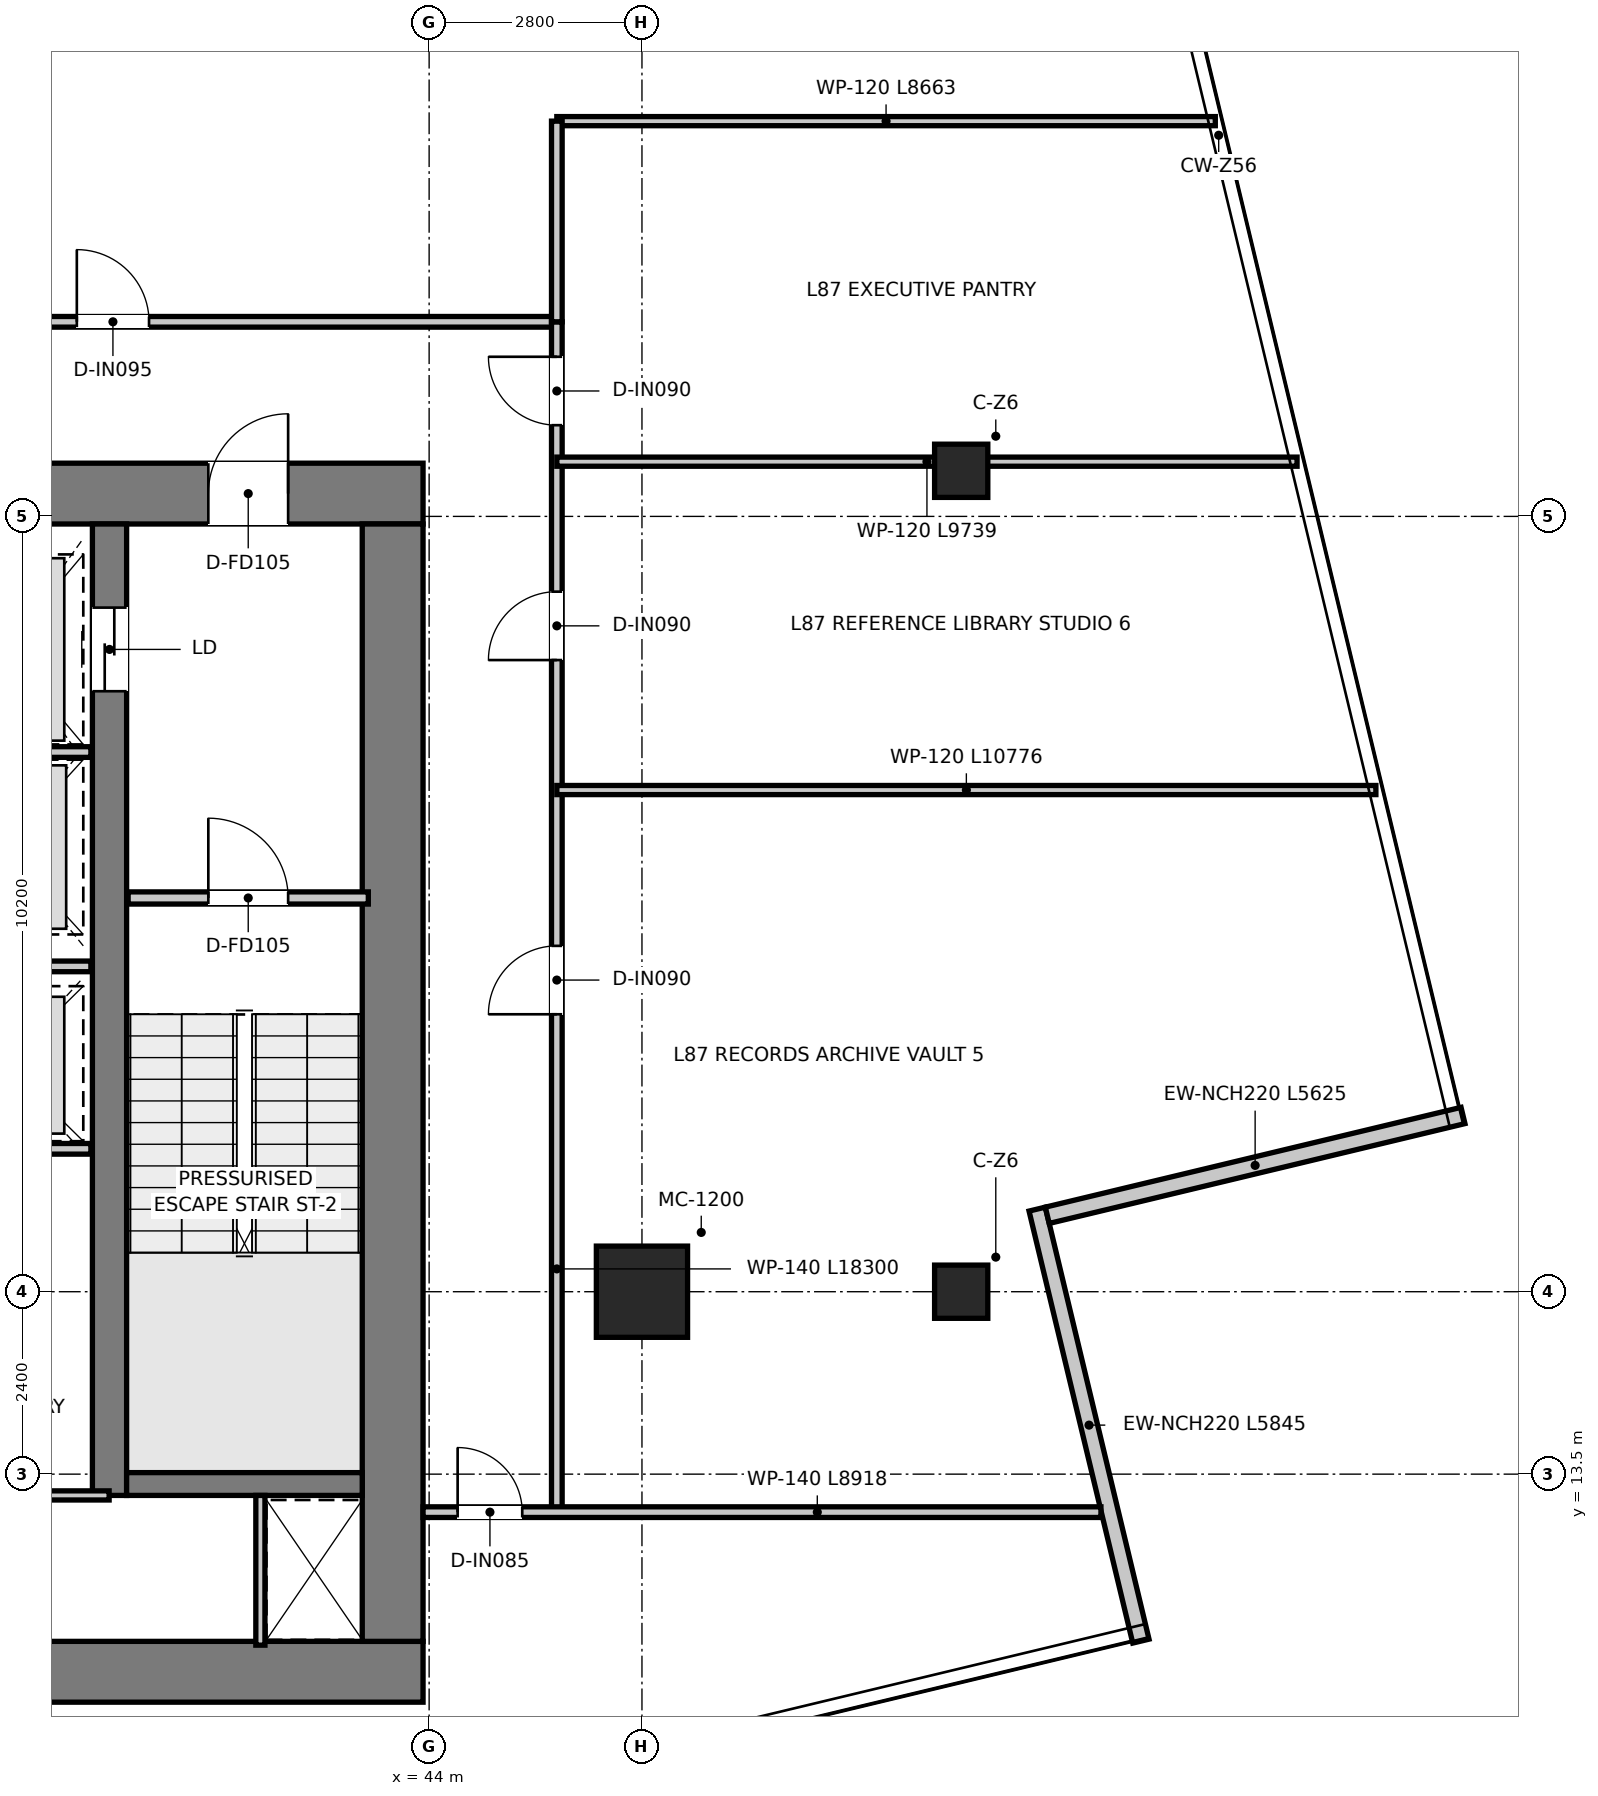
"""IFC4 building model, lengths in metres.
Left out: names, types, materials, properties, quantities, classifications, styles, units other than length and angle.
Written with IfcOpenShell. Run it as: python <this file> out.ifc"""

import sys

from ifc_helpers import new_model, si_unit, direction, frame, frame_2d, origin, origin_2d, place, context, subcontext, project, spatial, rectangle, extrude, source, transform, mapped, element, fill, save


model = new_model("IFC4")
c1 = context("Model", 3, precision=1e-05, world=origin(), true_north=direction((0.0, 1.0)))
c2 = subcontext(c1, "Body", "Model", "MODEL_VIEW")
j1 = project(units=[si_unit("LENGTHUNIT", "METRE"), si_unit("PLANEANGLEUNIT", "RADIAN")], contexts=[c1])
p1 = place(None, origin())
s1 = spatial("IfcSite", under=j1, at=p1, CompositionType="ELEMENT")
p2 = place(p1, origin())
s2 = spatial("IfcBuilding", under=s1, at=p2, CompositionType="ELEMENT")
p3 = place(p2, frame((0.0, 0.0, 355.35)))
s3 = spatial("IfcBuildingStorey", under=s2, at=p3, CompositionType="ELEMENT", Elevation=355.35)
p4 = place(p3, frame((28.08, 10.9, 0.0), z_axis=(0.0, 0.0, 1.0), x_axis=(1.0, 0.0, 0.0)))
e1 = element("IfcWall", 1, at=p4, inside=s3, PredefinedType="SHEAR", context=c2, shape_type="SweptSolid", body=[
    extrude(rectangle(XDim=15.84, YDim=0.8, at=frame_2d((7.92, 0.0))), origin(), (0.0, 0.0, 1.0), 3.95),
])
p5 = place(p3, frame((28.08, 26.4, 0.0), z_axis=(0.0, 0.0, 1.0), x_axis=(1.0, 0.0, 0.0)))
e2 = element("IfcWall", 2, at=p5, inside=s3, PredefinedType="SHEAR", context=c2, shape_type="SweptSolid", body=[
    extrude(rectangle(XDim=15.84, YDim=0.8, at=frame_2d((7.92, 0.0))), origin(), (0.0, 0.0, 1.0), 3.95),
])
p6 = place(p5, frame((7.22, 0.0, 0.0)))
e3 = element("IfcOpeningElement", 3, at=p6, cuts=e2, PredefinedType="OPENING", context=c2, shape_type="SweptSolid", body=[
    extrude(rectangle(XDim=1.4, YDim=2.2, at=frame_2d((0.7, 1.1))), frame((0.0, 0.41, 0.0), z_axis=(0.0, -1.0, 0.0), x_axis=(1.0, 0.0, 0.0)), (0.0, 0.0, 1.0), 0.82),
])
p7 = place(p5, frame((1.775, 0.0, 0.0)))
e4 = element("IfcOpeningElement", 4, at=p7, cuts=e2, PredefinedType="OPENING", context=c2, shape_type="SweptSolid", body=[
    extrude(rectangle(XDim=1.05, YDim=2.1, at=frame_2d((0.525, 1.05))), frame((0.0, 0.41, 0.0), z_axis=(0.0, -1.0, 0.0), x_axis=(1.0, 0.0, 0.0)), (0.0, 0.0, 1.0), 0.82),
])
p8 = place(p5, frame((13.015, 0.0, 0.0)))
e5 = element("IfcOpeningElement", 5, at=p8, cuts=e2, PredefinedType="OPENING", context=c2, shape_type="SweptSolid", body=[
    extrude(rectangle(XDim=1.05, YDim=2.1, at=frame_2d((0.525, 1.05))), frame((0.0, 0.41, 0.0), z_axis=(0.0, -1.0, 0.0), x_axis=(1.0, 0.0, 0.0)), (0.0, 0.0, 1.0), 0.82),
])
p9 = place(p3, frame((43.52, 11.3, 0.0), z_axis=(0.0, 0.0, 1.0), x_axis=(0.0, 1.0, 0.0)))
e6 = element("IfcWall", 6, at=p9, inside=s3, PredefinedType="SHEAR", context=c2, shape_type="SweptSolid", body=[
    extrude(rectangle(XDim=14.7, YDim=0.8, at=frame_2d((7.35, 0.0))), origin(), (0.0, 0.0, 1.0), 3.95),
])
p10 = place(p3, frame((39.795, 13.22, 0.0), z_axis=(0.0, 0.0, 1.0), x_axis=(0.0, 1.0, 0.0)))
e7 = element("IfcWall", 7, at=p10, inside=s3, PredefinedType="SHEAR", context=c2, shape_type="SweptSolid", body=[
    extrude(rectangle(XDim=12.78, YDim=0.45, at=frame_2d((6.39, 0.0))), origin(), (0.0, 0.0, 1.0), 3.95),
])
p11 = place(p10, frame((10.58, 0.0, 0.0)))
e8 = element("IfcOpeningElement", 8, at=p11, cuts=e7, PredefinedType="OPENING", context=c2, shape_type="SweptSolid", body=[
    extrude(rectangle(XDim=1.1, YDim=2.15, at=frame_2d((0.55, 1.075))), frame((0.0, 0.235, 0.0), z_axis=(0.0, -1.0, 0.0), x_axis=(1.0, 0.0, 0.0)), (0.0, 0.0, 1.0), 0.47),
])
p12 = place(p3, frame((40.02, 13.37, 0.0), z_axis=(0.0, 0.0, 1.0), x_axis=(1.0, 0.0, 0.0)))
e9 = element("IfcWall", 9, at=p12, inside=s3, PredefinedType="SHEAR", context=c2, shape_type="SweptSolid", body=[
    extrude(rectangle(XDim=3.1, YDim=0.3, at=frame_2d((1.55, 0.0))), origin(), (0.0, 0.0, 1.0), 3.95),
])
m1 = source(origin(), c2, "Body", "SweptSolid", [
    extrude(rectangle(XDim=1.2, YDim=1.2, at=origin_2d()), origin(), (0.0, 0.0, 1.0), 3.95),
])
p13 = place(p3, frame((46.8, 15.9, 0.0), z_axis=(0.0, 0.0, 1.0), x_axis=(1.0, 0.0, 0.0)))
e10 = element("IfcColumn", 10, at=p13, inside=s3, PredefinedType="USERDEFINED", context=c2, shape_type="MappedRepresentation", body=[
    mapped(m1, transform((0.0, 0.0, 0.0), x_axis=(1.0, 0.0, 0.0), y_axis=(0.0, 1.0, 0.0), z_axis=(0.0, 0.0, 1.0), scale=1.0)),
])
m2 = source(origin(), c2, "Body", "SweptSolid", [
    extrude(rectangle(XDim=0.7, YDim=0.7, at=origin_2d()), origin(), (0.0, 0.0, 1.0), 3.95),
])
for number, where, z_axis, x_axis in (
    (11, (51.0, 26.7, 0.0), (0.0, 0.0, 1.0), (1.0, 0.0, 0.0)),
    (12, (51.0, 15.9, 0.0), (0.0, 0.0, 1.0), (1.0, 0.0, 0.0)),
):
    element("IfcColumn", number, at=place(p3, frame(where, z_axis=z_axis, x_axis=x_axis)), inside=s3, PredefinedType="COLUMN", context=c2, shape_type="MappedRepresentation", body=[
        mapped(m2, transform((0.0, 0.0, 0.0), x_axis=(1.0, 0.0, 0.0), y_axis=(0.0, 1.0, 0.0), z_axis=(0.0, 0.0, 1.0), scale=1.0)),
    ])
p14 = place(p3, frame((53.364, 11.303, 0.0), z_axis=(0.0, 0.0, 1.0), x_axis=(-0.233453521986, 0.972367961768, 0.0)))
e13 = element("IfcWall", 13, at=p14, inside=s3, PredefinedType="ELEMENTEDWALL", context=c2, shape_type="SweptSolid", body=[
    extrude(rectangle(XDim=5.845, YDim=0.22, at=frame_2d((2.922, 0.0))), origin(), (0.0, 0.0, 1.0), 3.67),
])
p15 = place(p3, frame((52.132, 16.905, 0.0), z_axis=(0.0, 0.0, 1.0), x_axis=(0.972364840687, 0.233466521361, 0.0)))
e14 = element("IfcWall", 14, at=p15, inside=s3, PredefinedType="ELEMENTEDWALL", context=c2, shape_type="SweptSolid", body=[
    extrude(rectangle(XDim=5.625, YDim=0.22, at=frame_2d((2.812, 0.0))), origin(), (0.0, 0.0, 1.0), 3.67),
])
p16 = place(p3, frame((40.04, 21.08, 0.0), z_axis=(0.0, 0.0, 1.0), x_axis=(1.0, 0.0, 0.0)))
e15 = element("IfcWall", 15, at=p16, inside=s3, PredefinedType="PARTITIONING", context=c2, shape_type="SweptSolid", body=[
    extrude(rectangle(XDim=3.16, YDim=0.16, at=frame_2d((1.58, 0.0))), origin(), (0.0, 0.0, 1.0), 3.67),
])
p17 = place(p16, frame((1.055, 0.0, 0.0)))
e16 = element("IfcOpeningElement", 16, at=p17, cuts=e15, PredefinedType="OPENING", context=c2, shape_type="SweptSolid", body=[
    extrude(rectangle(XDim=1.05, YDim=2.1, at=frame_2d((0.525, 1.05))), frame((0.0, 0.09, 0.0), z_axis=(0.0, -1.0, 0.0), x_axis=(1.0, 0.0, 0.0)), (0.0, 0.0, 1.0), 0.18),
])
p18 = place(p3, frame((37.28, 23.0, 0.0), z_axis=(0.0, 0.0, 1.0), x_axis=(1.0, 0.0, 0.0)))
e17 = element("IfcWall", 17, at=p18, inside=s3, PredefinedType="PARTITIONING", context=c2, shape_type="SweptSolid", body=[
    extrude(rectangle(XDim=2.27, YDim=0.14, at=frame_2d((1.135, 0.0))), origin(), (0.0, 0.0, 1.0), 2.82),
])
for number, where, z_axis, x_axis in (
    (18, (37.28, 17.78, 0.0), (0.0, 0.0, 1.0), (1.0, 0.0, 0.0)),
    (19, (37.28, 20.18, 0.0), (0.0, 0.0, 1.0), (1.0, 0.0, 0.0)),
):
    element("IfcWall", number, at=place(p3, frame(where, z_axis=z_axis, x_axis=x_axis)), inside=s3, PredefinedType="PARTITIONING", context=c2, shape_type="SweptSolid", body=[
        extrude(rectangle(XDim=2.27, YDim=0.14, at=frame_2d((1.135, 0.0))), origin(), (0.0, 0.0, 1.0), 3.67),
    ])
p19 = place(p3, frame((41.78, 11.25, 0.0), z_axis=(0.0, 0.0, 1.0), x_axis=(0.0, 1.0, 0.0)))
e20 = element("IfcWall", 20, at=p19, inside=s3, PredefinedType="PARTITIONING", context=c2, shape_type="SweptSolid", body=[
    extrude(rectangle(XDim=1.97, YDim=0.12, at=frame_2d((0.985, 0.0))), origin(), (0.0, 0.0, 1.0), 3.67),
])
p20 = place(p3, frame((32.21, 13.22, 0.0), z_axis=(0.0, 0.0, 1.0), x_axis=(1.0, 0.0, 0.0)))
e21 = element("IfcWall", 21, at=p20, inside=s3, PredefinedType="PARTITIONING", context=c2, shape_type="SweptSolid", body=[
    extrude(rectangle(XDim=7.58, YDim=0.12, at=frame_2d((3.79, 0.0))), origin(), (0.0, 0.0, 1.0), 3.67),
])
p21 = place(p20, frame((3.365, 0.0, 0.0)))
e22 = element("IfcOpeningElement", 22, at=p21, cuts=e21, PredefinedType="OPENING", context=c2, shape_type="SweptSolid", body=[
    extrude(rectangle(XDim=0.85, YDim=2.1, at=frame_2d((0.425, 1.05))), frame((0.0, 0.07, 0.0), z_axis=(0.0, -1.0, 0.0), x_axis=(1.0, 0.0, 0.0)), (0.0, 0.0, 1.0), 0.14),
])
p22 = place(p3, frame((26.32, 28.66, 0.0), z_axis=(0.0, 0.0, 1.0), x_axis=(1.0, 0.0, 0.0)))
e23 = element("IfcWall", 23, at=p22, inside=s3, PredefinedType="PARTITIONING", context=c2, shape_type="SweptSolid", body=[
    extrude(rectangle(XDim=19.36, YDim=0.14, at=frame_2d((9.68, 0.0))), origin(), (0.0, 0.0, 1.0), 3.18),
])
p23 = place(p22, frame((3.365, 0.0, 0.0)))
e24 = element("IfcOpeningElement", 24, at=p23, cuts=e23, PredefinedType="OPENING", context=c2, shape_type="SweptSolid", body=[
    extrude(rectangle(XDim=0.95, YDim=2.1, at=frame_2d((0.475, 1.05))), frame((0.0, 0.08, 0.0), z_axis=(0.0, -1.0, 0.0), x_axis=(1.0, 0.0, 0.0)), (0.0, 0.0, 1.0), 0.16),
])
p24 = place(p22, frame((13.045, 0.0, 0.0)))
e25 = element("IfcOpeningElement", 25, at=p24, cuts=e23, PredefinedType="OPENING", context=c2, shape_type="SweptSolid", body=[
    extrude(rectangle(XDim=0.95, YDim=2.1, at=frame_2d((0.475, 1.05))), frame((0.0, 0.08, 0.0), z_axis=(0.0, -1.0, 0.0), x_axis=(1.0, 0.0, 0.0)), (0.0, 0.0, 1.0), 0.16),
])
p25 = place(p3, frame((45.68, 13.0, 0.0), z_axis=(0.0, 0.0, 1.0), x_axis=(0.0, 1.0, 0.0)))
e26 = element("IfcWall", 26, at=p25, inside=s3, PredefinedType="PARTITIONING", context=c2, shape_type="SweptSolid", body=[
    extrude(rectangle(XDim=15.66, YDim=0.14, at=frame_2d((7.83, 0.0))), origin(), (0.0, 0.0, 1.0), 3.13),
])
p26 = place(p25, frame((14.3, 0.0, 0.0)))
e27 = element("IfcOpeningElement", 27, at=p26, cuts=e26, PredefinedType="OPENING", context=c2, shape_type="SweptSolid", body=[
    extrude(rectangle(XDim=0.9, YDim=2.1, at=frame_2d((0.45, 1.05))), frame((0.0, 0.08, 0.0), z_axis=(0.0, -1.0, 0.0), x_axis=(1.0, 0.0, 0.0)), (0.0, 0.0, 1.0), 0.16),
])
p27 = place(p25, frame((6.55, 0.0, 0.0)))
e28 = element("IfcOpeningElement", 28, at=p27, cuts=e26, PredefinedType="OPENING", context=c2, shape_type="SweptSolid", body=[
    extrude(rectangle(XDim=0.9, YDim=2.1, at=frame_2d((0.45, 1.05))), frame((0.0, 0.08, 0.0), z_axis=(0.0, -1.0, 0.0), x_axis=(1.0, 0.0, 0.0)), (0.0, 0.0, 1.0), 0.16),
])
p28 = place(p25, frame((11.21, 0.0, 0.0)))
e29 = element("IfcOpeningElement", 29, at=p28, cuts=e26, PredefinedType="OPENING", context=c2, shape_type="SweptSolid", body=[
    extrude(rectangle(XDim=0.9, YDim=2.1, at=frame_2d((0.45, 1.05))), frame((0.0, 0.08, 0.0), z_axis=(0.0, -1.0, 0.0), x_axis=(1.0, 0.0, 0.0)), (0.0, 0.0, 1.0), 0.16),
])
p29 = place(p3, frame((43.92, 13.0, 0.0), z_axis=(0.0, 0.0, 1.0), x_axis=(1.0, 0.0, 0.0)))
e30 = element("IfcWall", 30, at=p29, inside=s3, PredefinedType="PARTITIONING", context=c2, shape_type="SweptSolid", body=[
    extrude(rectangle(XDim=8.918, YDim=0.14, at=frame_2d((4.459, 0.0))), origin(), (0.0, 0.0, 1.0), 3.18),
])
p30 = place(p29, frame((0.455, 0.0, 0.0)))
e31 = element("IfcOpeningElement", 31, at=p30, cuts=e30, PredefinedType="OPENING", context=c2, shape_type="SweptSolid", body=[
    extrude(rectangle(XDim=0.85, YDim=2.1, at=frame_2d((0.425, 1.05))), frame((0.0, 0.08, 0.0), z_axis=(0.0, -1.0, 0.0), x_axis=(1.0, 0.0, 0.0)), (0.0, 0.0, 1.0), 0.16),
])
p31 = place(p3, frame((45.68, 26.82, 0.0), z_axis=(0.0, 0.0, 1.0), x_axis=(1.0, 0.0, 0.0)))
e32 = element("IfcWall", 32, at=p31, inside=s3, PredefinedType="PARTITIONING", context=c2, shape_type="SweptSolid", body=[
    extrude(rectangle(XDim=9.739, YDim=0.12, at=frame_2d((4.869, 0.0))), origin(), (0.0, 0.0, 1.0), 3.13),
])
p32 = place(p3, frame((45.68, 31.3, 0.0), z_axis=(0.0, 0.0, 1.0), x_axis=(1.0, 0.0, 0.0)))
e33 = element("IfcWall", 33, at=p32, inside=s3, PredefinedType="PARTITIONING", context=c2, shape_type="SweptSolid", body=[
    extrude(rectangle(XDim=8.663, YDim=0.12, at=frame_2d((4.332, 0.0))), origin(), (0.0, 0.0, 1.0), 3.13),
])
p33 = place(p3, frame((45.68, 28.66, 0.0), z_axis=(0.0, 0.0, 1.0), x_axis=(0.0, 1.0, 0.0)))
e34 = element("IfcWall", 34, at=p33, inside=s3, PredefinedType="PARTITIONING", context=c2, shape_type="SweptSolid", body=[
    extrude(rectangle(XDim=2.64, YDim=0.14, at=frame_2d((1.32, 0.0))), origin(), (0.0, 0.0, 1.0), 3.43),
])
p34 = place(p3, frame((45.68, 22.5, 0.0), z_axis=(0.0, 0.0, 1.0), x_axis=(1.0, 0.0, 0.0)))
e35 = element("IfcWall", 35, at=p34, inside=s3, PredefinedType="PARTITIONING", context=c2, shape_type="SweptSolid", body=[
    extrude(rectangle(XDim=10.776, YDim=0.12, at=frame_2d((5.388, 0.0))), origin(), (0.0, 0.0, 1.0), 3.13),
])
p35 = place(p17, origin())
e36 = element("IfcDoor", 36, at=p35, inside=s3, OperationType="SINGLE_SWING_LEFT", PredefinedType="DOOR", context=c2, shape_type="SweptSolid", body=[
    extrude(rectangle(XDim=1.05, YDim=2.1, at=frame_2d((0.525, 1.05))), frame((0.0, 0.025, 0.0), z_axis=(0.0, -1.0, 0.0), x_axis=(1.0, 0.0, 0.0)), (0.0, 0.0, 1.0), 0.05),
])
fill(e16, e36)
p36 = place(p8, origin())
e37 = element("IfcDoor", 37, at=p36, inside=s3, OperationType="SINGLE_SWING_RIGHT", PredefinedType="DOOR", context=c2, shape_type="SweptSolid", body=[
    extrude(rectangle(XDim=1.05, YDim=2.1, at=frame_2d((0.525, 1.05))), frame((0.0, 0.025, 0.0), z_axis=(0.0, -1.0, 0.0), x_axis=(1.0, 0.0, 0.0)), (0.0, 0.0, 1.0), 0.05),
])
fill(e5, e37)
p37 = place(p11, origin())
e38 = element("IfcDoor", 38, at=p37, inside=s3, OperationType="DOUBLE_DOOR_SLIDING", PredefinedType="DOOR", context=c2, shape_type="SweptSolid", body=[
    extrude(rectangle(XDim=1.1, YDim=2.15, at=frame_2d((0.55, 1.075))), frame((0.0, 0.025, 0.0), z_axis=(0.0, -1.0, 0.0), x_axis=(1.0, 0.0, 0.0)), (0.0, 0.0, 1.0), 0.05),
])
fill(e8, e38)
p38 = place(p26, origin())
e39 = element("IfcDoor", 39, at=p38, inside=s3, OperationType="SINGLE_SWING_RIGHT", PredefinedType="DOOR", context=c2, shape_type="SweptSolid", body=[
    extrude(rectangle(XDim=0.9, YDim=2.1, at=frame_2d((0.45, 1.05))), frame((0.0, 0.025, 0.0), z_axis=(0.0, -1.0, 0.0), x_axis=(1.0, 0.0, 0.0)), (0.0, 0.0, 1.0), 0.05),
])
fill(e27, e39)
p39 = place(p24, origin())
e40 = element("IfcDoor", 40, at=p39, inside=s3, OperationType="SINGLE_SWING_LEFT", PredefinedType="DOOR", context=c2, shape_type="SweptSolid", body=[
    extrude(rectangle(XDim=0.95, YDim=2.1, at=frame_2d((0.475, 1.05))), frame((0.0, 0.025, 0.0), z_axis=(0.0, -1.0, 0.0), x_axis=(1.0, 0.0, 0.0)), (0.0, 0.0, 1.0), 0.05),
])
fill(e25, e40)
p40 = place(p27, origin())
e41 = element("IfcDoor", 41, at=p40, inside=s3, OperationType="SINGLE_SWING_LEFT", PredefinedType="DOOR", context=c2, shape_type="SweptSolid", body=[
    extrude(rectangle(XDim=0.9, YDim=2.1, at=frame_2d((0.45, 1.05))), frame((0.0, 0.025, 0.0), z_axis=(0.0, -1.0, 0.0), x_axis=(1.0, 0.0, 0.0)), (0.0, 0.0, 1.0), 0.05),
])
fill(e28, e41)
p41 = place(p28, origin())
e42 = element("IfcDoor", 42, at=p41, inside=s3, OperationType="SINGLE_SWING_LEFT", PredefinedType="DOOR", context=c2, shape_type="SweptSolid", body=[
    extrude(rectangle(XDim=0.9, YDim=2.1, at=frame_2d((0.45, 1.05))), frame((0.0, 0.025, 0.0), z_axis=(0.0, -1.0, 0.0), x_axis=(1.0, 0.0, 0.0)), (0.0, 0.0, 1.0), 0.05),
])
fill(e29, e42)
p42 = place(p30, origin())
e43 = element("IfcDoor", 43, at=p42, inside=s3, OperationType="SINGLE_SWING_LEFT", PredefinedType="DOOR", context=c2, shape_type="SweptSolid", body=[
    extrude(rectangle(XDim=0.85, YDim=2.1, at=frame_2d((0.425, 1.05))), frame((0.0, 0.025, 0.0), z_axis=(0.0, -1.0, 0.0), x_axis=(1.0, 0.0, 0.0)), (0.0, 0.0, 1.0), 0.05),
])
fill(e31, e43)
save(model, sys.argv[1])
